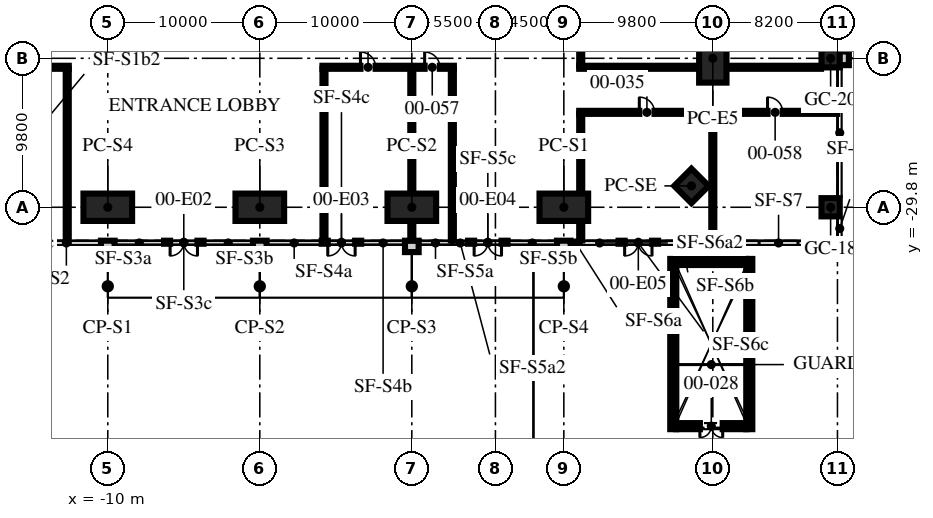
"""IFC4 building model, lengths in metres.
Left out: names, types, materials, properties, quantities, classifications, styles, units other than length and angle.
Written with IfcOpenShell. Run it as: python <this file> out.ifc"""

import sys

from ifc_helpers import new_model, si_unit, direction, frame, frame_2d, origin, origin_2d, place, context, subcontext, project, spatial, rectangle, hollow_rectangle, hollow_circle, extrude, element, fill, save


model = new_model("IFC4")
c1 = context("Model", 3, precision=1e-05, world=origin(), true_north=direction((0.0, 1.0)))
c2 = subcontext(c1, "Body", "Model", "MODEL_VIEW")
j1 = project(units=[si_unit("LENGTHUNIT", "METRE"), si_unit("PLANEANGLEUNIT", "RADIAN")], contexts=[c1])
p1 = place(None, origin())
s1 = spatial("IfcSite", under=j1, at=p1, CompositionType="ELEMENT")
p2 = place(p1, origin())
s2 = spatial("IfcBuilding", under=s1, at=p2, CompositionType="ELEMENT")
p3 = place(p2, origin())
s3 = spatial("IfcBuildingStorey", under=s2, at=p3, CompositionType="ELEMENT", Elevation=0.0)
for number, where, z_axis, x_axis in (
    (1, (29.8, -20.0, 0.0), (0.0, 0.0, 1.0), (0.0, 1.0, 0.0)),
    (2, (20.0, -29.8, 0.0), (0.0, 0.0, 1.0), (1.0, 0.0, 0.0)),
    (3, (10.0, -29.8, 0.0), (0.0, 0.0, 1.0), (1.0, 0.0, 0.0)),
    (4, (0.0, -29.8, 0.0), (0.0, 0.0, 1.0), (1.0, 0.0, 0.0)),
    (5, (-10.0, -29.8, 0.0), (0.0, 0.0, 1.0), (1.0, 0.0, 0.0)),
):
    element("IfcColumn", number, at=place(p3, frame(where, z_axis=z_axis, x_axis=x_axis)), inside=s3, PredefinedType="COLUMN", context=c2, shape_type="SweptSolid", body=[
        extrude(hollow_rectangle(XDim=3.2, YDim=1.8, WallThickness=0.2, at=origin_2d()), origin(), (0.0, 0.0, 1.0), 6.0),
    ])
p4 = place(p3, frame((28.394, -28.394, 0.0), z_axis=(0.0, 0.0, 1.0), x_axis=(0.707106781187, 0.707106781187, 0.0)))
e6 = element("IfcColumn", 6, at=p4, inside=s3, PredefinedType="COLUMN", context=c2, shape_type="SweptSolid", body=[
    extrude(hollow_rectangle(XDim=1.6, YDim=1.6, WallThickness=0.1, at=origin_2d()), origin(), (0.0, 0.0, 1.0), 6.0),
])
for number, where, z_axis, x_axis in (
    (7, (37.55, -29.8, 0.0), (0.0, 0.0, 1.0), (1.0, 0.0, 0.0)),
    (8, (37.55, -20.0, 0.0), (0.0, 0.0, 1.0), (1.0, 0.0, 0.0)),
):
    element("IfcColumn", number, at=place(p3, frame(where, z_axis=z_axis, x_axis=x_axis)), inside=s3, PredefinedType="COLUMN", context=c2, shape_type="SweptSolid", body=[
        extrude(rectangle(XDim=1.2, YDim=1.2, at=origin_2d()), origin(), (0.0, 0.0, 1.0), 6.0),
    ])
for number, where, z_axis, x_axis in (
    (9, (-10.45, -32.375, -0.2), (0.0, 0.0, 1.0), (1.0, 0.0, 0.0)),
    (10, (-0.45, -32.375, -0.2), (0.0, 0.0, 1.0), (1.0, 0.0, 0.0)),
    (11, (9.55, -32.375, -0.2), (0.0, 0.0, 1.0), (1.0, 0.0, 0.0)),
    (12, (19.55, -32.375, -0.2), (0.0, 0.0, 1.0), (1.0, 0.0, 0.0)),
    (13, (29.35, -32.375, -0.2), (0.0, 0.0, 1.0), (1.0, 0.0, 0.0)),
):
    element("IfcWall", number, at=place(p3, frame(where, z_axis=z_axis, x_axis=x_axis)), inside=s3, PredefinedType="SOLIDWALL", context=c2, shape_type="SweptSolid", body=[
        extrude(rectangle(XDim=0.9, YDim=0.75, at=frame_2d((0.45, 0.0))), origin(), (0.0, 0.0, 1.0), 6.2),
    ])
p5 = place(p3, frame((38.0, -32.375, -0.2), z_axis=(0.0, 0.0, 1.0), x_axis=(1.0, 0.0, 0.0)))
e14 = element("IfcWall", 14, at=p5, inside=s3, PredefinedType="SOLIDWALL", context=c2, shape_type="SweptSolid", body=[
    extrude(rectangle(XDim=0.75, YDim=0.75, at=frame_2d((0.375, 0.0))), origin(), (0.0, 0.0, 1.0), 6.2),
])
p6 = place(p3, frame((-6.3, -32.1, 0.0), z_axis=(0.0, 0.0, 1.0), x_axis=(1.0, 0.0, 0.0)))
e15 = element("IfcWall", 15, at=p6, inside=s3, PredefinedType="ELEMENTEDWALL", context=c2, shape_type="SweptSolid", body=[
    extrude(rectangle(XDim=2.6, YDim=0.2, at=frame_2d((1.3, 0.0))), origin(), (0.0, 0.0, 1.0), 3.2),
])
p7 = place(p6, frame((2.2, 0.0, 0.0), z_axis=(0.0, 0.0, 1.0), x_axis=(-1.0, 0.0, 0.0)))
e16 = element("IfcOpeningElement", 16, at=p7, cuts=e15, PredefinedType="OPENING", context=c2, shape_type="SweptSolid", body=[
    extrude(rectangle(XDim=1.8, YDim=2.7, at=frame_2d((0.9, 1.35))), frame((0.0, 0.11, 0.0), z_axis=(0.0, -1.0, 0.0), x_axis=(1.0, 0.0, 0.0)), (0.0, 0.0, 1.0), 0.22),
])
p8 = place(p3, frame((4.072, -32.1, 0.0), z_axis=(0.0, 0.0, 1.0), x_axis=(1.0, 0.0, 0.0)))
e17 = element("IfcWall", 17, at=p8, inside=s3, PredefinedType="ELEMENTEDWALL", context=c2, shape_type="SweptSolid", body=[
    extrude(rectangle(XDim=2.6, YDim=0.2, at=frame_2d((1.3, 0.0))), origin(), (0.0, 0.0, 1.0), 3.2),
])
p9 = place(p8, frame((2.2, 0.0, 0.0), z_axis=(0.0, 0.0, 1.0), x_axis=(-1.0, 0.0, 0.0)))
e18 = element("IfcOpeningElement", 18, at=p9, cuts=e17, PredefinedType="OPENING", context=c2, shape_type="SweptSolid", body=[
    extrude(rectangle(XDim=1.8, YDim=2.7, at=frame_2d((0.9, 1.35))), frame((0.0, 0.11, 0.0), z_axis=(0.0, -1.0, 0.0), x_axis=(1.0, 0.0, 0.0)), (0.0, 0.0, 1.0), 0.22),
])
p10 = place(p3, frame((13.7, -32.1, 0.0), z_axis=(0.0, 0.0, 1.0), x_axis=(1.0, 0.0, 0.0)))
e19 = element("IfcWall", 19, at=p10, inside=s3, PredefinedType="ELEMENTEDWALL", context=c2, shape_type="SweptSolid", body=[
    extrude(rectangle(XDim=2.6, YDim=0.2, at=frame_2d((1.3, 0.0))), origin(), (0.0, 0.0, 1.0), 3.2),
])
p11 = place(p10, frame((2.2, 0.0, 0.0), z_axis=(0.0, 0.0, 1.0), x_axis=(-1.0, 0.0, 0.0)))
e20 = element("IfcOpeningElement", 20, at=p11, cuts=e19, PredefinedType="OPENING", context=c2, shape_type="SweptSolid", body=[
    extrude(rectangle(XDim=1.8, YDim=2.7, at=frame_2d((0.9, 1.35))), frame((0.0, 0.11, 0.0), z_axis=(0.0, -1.0, 0.0), x_axis=(1.0, 0.0, 0.0)), (0.0, 0.0, 1.0), 0.22),
])
p12 = place(p3, frame((23.6, -32.1, 0.0), z_axis=(0.0, 0.0, 1.0), x_axis=(1.0, 0.0, 0.0)))
e21 = element("IfcWall", 21, at=p12, inside=s3, PredefinedType="ELEMENTEDWALL", context=c2, shape_type="SweptSolid", body=[
    extrude(rectangle(XDim=2.6, YDim=0.2, at=frame_2d((1.3, 0.0))), origin(), (0.0, 0.0, 1.0), 3.2),
])
p13 = place(p12, frame((2.2, 0.0, 0.0), z_axis=(0.0, 0.0, 1.0), x_axis=(-1.0, 0.0, 0.0)))
e22 = element("IfcOpeningElement", 22, at=p13, cuts=e21, PredefinedType="OPENING", context=c2, shape_type="SweptSolid", body=[
    extrude(rectangle(XDim=1.8, YDim=2.7, at=frame_2d((0.9, 1.35))), frame((0.0, 0.11, 0.0), z_axis=(0.0, -1.0, 0.0), x_axis=(1.0, 0.0, 0.0)), (0.0, 0.0, 1.0), 0.22),
])
p14 = place(p3, frame((38.375, -20.45, -0.2), z_axis=(0.0, 0.0, 1.0), x_axis=(0.0, 1.0, 0.0)))
e23 = element("IfcWall", 23, at=p14, inside=s3, PredefinedType="SOLIDWALL", context=c2, shape_type="SweptSolid", body=[
    extrude(rectangle(XDim=0.9, YDim=0.75, at=frame_2d((0.45, 0.0))), origin(), (0.0, 0.0, 1.0), 6.2),
])
for number, where, z_axis, x_axis in (
    (24, (-10.0, -35.0, -0.16), (0.0, 0.0, 1.0), (1.0, 0.0, 0.0)),
    (25, (0.0, -35.0, -0.16), (0.0, 0.0, 1.0), (1.0, 0.0, 0.0)),
    (26, (10.0, -35.0, -0.16), (0.0, 0.0, 1.0), (1.0, 0.0, 0.0)),
    (27, (20.0, -35.0, -0.16), (0.0, 0.0, 1.0), (1.0, 0.0, 0.0)),
):
    element("IfcColumn", number, at=place(p3, frame(where, z_axis=z_axis, x_axis=x_axis)), inside=s3, PredefinedType="COLUMN", context=c2, shape_type="SweptSolid", body=[
        extrude(hollow_circle(Radius=0.203, WallThickness=0.012, at=origin_2d()), origin(), (0.0, 0.0, 1.0), 4.16),
    ])
for number, where, z_axis, x_axis in (
    (28, (27.2, -44.4, -0.6), (0.0, 0.0, 1.0), (0.0, 1.0, 0.0)),
    (29, (32.2, -44.4, -0.6), (0.0, 0.0, 1.0), (0.0, 1.0, 0.0)),
):
    element("IfcWall", number, at=place(p3, frame(where, z_axis=z_axis, x_axis=x_axis)), inside=s3, PredefinedType="SOLIDWALL", context=c2, shape_type="SweptSolid", body=[
        extrude(rectangle(XDim=11.2, YDim=0.4, at=frame_2d((5.6, 0.0))), origin(), (0.0, 0.0, 1.0), 3.8),
    ])
p15 = place(p3, frame((27.4, -44.2, -0.6), z_axis=(0.0, 0.0, 1.0), x_axis=(1.0, 0.0, 0.0)))
e30 = element("IfcWall", 30, at=p15, inside=s3, PredefinedType="SOLIDWALL", context=c2, shape_type="SweptSolid", body=[
    extrude(rectangle(XDim=4.6, YDim=0.4, at=frame_2d((2.3, 0.0))), origin(), (0.0, 0.0, 1.0), 3.8),
])
p16 = place(p15, frame((3.05, 0.0, 0.6), z_axis=(0.0, 0.0, 1.0), x_axis=(-1.0, 0.0, 0.0)))
e31 = element("IfcOpeningElement", 31, at=p16, cuts=e30, PredefinedType="OPENING", context=c2, shape_type="SweptSolid", body=[
    extrude(rectangle(XDim=1.5, YDim=2.1, at=frame_2d((0.75, 1.05))), frame((0.0, 0.21, 0.0), z_axis=(0.0, -1.0, 0.0), x_axis=(1.0, 0.0, 0.0)), (0.0, 0.0, 1.0), 0.42),
])
p17 = place(p3, frame((27.4, -33.4, -0.6), z_axis=(0.0, 0.0, 1.0), x_axis=(1.0, 0.0, 0.0)))
e32 = element("IfcWall", 32, at=p17, inside=s3, PredefinedType="SOLIDWALL", context=c2, shape_type="SweptSolid", body=[
    extrude(rectangle(XDim=4.6, YDim=0.4, at=frame_2d((2.3, 0.0))), origin(), (0.0, 0.0, 1.0), 3.8),
])
p18 = place(p3, frame((-12.667, -32.075, 0.0), z_axis=(0.0, 0.0, 1.0), x_axis=(0.0, 1.0, 0.0)))
e33 = element("IfcWall", 33, at=p18, inside=s3, PredefinedType="SOLIDWALL", context=c2, shape_type="SweptSolid", body=[
    extrude(rectangle(XDim=11.384, YDim=0.2, at=frame_2d((5.692, 0.0))), origin(), (0.0, 0.0, 1.0), 4.7),
])
p19 = place(p3, frame((4.222, -31.98, 0.0), z_axis=(0.0, 0.0, 1.0), x_axis=(0.0, 1.0, 0.0)))
e34 = element("IfcWall", 34, at=p19, inside=s3, PredefinedType="SOLIDWALL", context=c2, shape_type="SweptSolid", body=[
    extrude(rectangle(XDim=11.289, YDim=0.2, at=frame_2d((5.645, 0.0))), origin(), (0.0, 0.0, 1.0), 4.7),
])
p20 = place(p3, frame((10.0, -31.98, 0.0), z_axis=(0.0, 0.0, 1.0), x_axis=(0.0, 1.0, 0.0)))
e35 = element("IfcWall", 35, at=p20, inside=s3, PredefinedType="SOLIDWALL", context=c2, shape_type="SweptSolid", body=[
    extrude(rectangle(XDim=1.25, YDim=0.2, at=frame_2d((0.625, 0.0))), origin(), (0.0, 0.0, 1.0), 5.7),
])
p21 = place(p3, frame((12.667, -31.98, 0.0), z_axis=(0.0, 0.0, 1.0), x_axis=(0.0, 1.0, 0.0)))
e36 = element("IfcWall", 36, at=p21, inside=s3, PredefinedType="SOLIDWALL", context=c2, shape_type="SweptSolid", body=[
    extrude(rectangle(XDim=11.289, YDim=0.2, at=frame_2d((5.645, 0.0))), origin(), (0.0, 0.0, 1.0), 4.7),
])
p22 = place(p3, frame((21.111, -31.98, 0.0), z_axis=(0.0, 0.0, 1.0), x_axis=(0.0, 1.0, 0.0)))
e37 = element("IfcWall", 37, at=p22, inside=s3, PredefinedType="SOLIDWALL", context=c2, shape_type="SweptSolid", body=[
    extrude(rectangle(XDim=1.25, YDim=0.2, at=frame_2d((0.625, 0.0))), origin(), (0.0, 0.0, 1.0), 5.7),
])
p23 = place(p3, frame((29.8, -31.98, 0.0), z_axis=(0.0, 0.0, 1.0), x_axis=(0.0, 1.0, 0.0)))
e38 = element("IfcWall", 38, at=p23, inside=s3, PredefinedType="SOLIDWALL", context=c2, shape_type="SweptSolid", body=[
    extrude(rectangle(XDim=8.324, YDim=0.2, at=frame_2d((4.162, 0.0))), origin(), (0.0, 0.0, 1.0), 5.7),
])
p24 = place(p3, frame((10.0, -28.87, 0.0), z_axis=(0.0, 0.0, 1.0), x_axis=(0.0, 1.0, 0.0)))
e39 = element("IfcWall", 39, at=p24, inside=s3, PredefinedType="SOLIDWALL", context=c2, shape_type="SweptSolid", body=[
    extrude(rectangle(XDim=8.179, YDim=0.2, at=frame_2d((4.089, 0.0))), origin(), (0.0, 0.0, 1.0), 4.5),
])
p25 = place(p3, frame((21.111, -28.87, 0.0), z_axis=(0.0, 0.0, 1.0), x_axis=(0.0, 1.0, 0.0)))
e40 = element("IfcWall", 40, at=p25, inside=s3, PredefinedType="SOLIDWALL", context=c2, shape_type="SweptSolid", body=[
    extrude(rectangle(XDim=5.214, YDim=0.2, at=frame_2d((2.607, 0.0))), origin(), (0.0, 0.0, 1.0), 5.7),
])
p26 = place(p3, frame((21.011, -23.556, 0.0), z_axis=(0.0, 0.0, 1.0), x_axis=(1.0, 0.0, 0.0)))
e41 = element("IfcWall", 41, at=p26, inside=s3, PredefinedType="SOLIDWALL", context=c2, shape_type="SweptSolid", body=[
    extrude(rectangle(XDim=16.969, YDim=0.2, at=frame_2d((8.484, 0.0))), origin(), (0.0, 0.0, 1.0), 4.5),
])
p27 = place(p26, frame((3.955, 0.0, 0.0)))
e42 = element("IfcOpeningElement", 42, at=p27, cuts=e41, PredefinedType="OPENING", context=c2, shape_type="SweptSolid", body=[
    extrude(rectangle(XDim=1.0, YDim=2.1, at=frame_2d((0.5, 1.05))), frame((0.0, 0.11, 0.0), z_axis=(0.0, -1.0, 0.0), x_axis=(1.0, 0.0, 0.0)), (0.0, 0.0, 1.0), 0.22),
])
p28 = place(p26, frame((12.389, 0.0, 0.0)))
e43 = element("IfcOpeningElement", 43, at=p28, cuts=e41, PredefinedType="OPENING", context=c2, shape_type="SweptSolid", body=[
    extrude(rectangle(XDim=1.0, YDim=2.1, at=frame_2d((0.5, 1.05))), frame((0.0, 0.11, 0.0), z_axis=(0.0, -1.0, 0.0), x_axis=(1.0, 0.0, 0.0)), (0.0, 0.0, 1.0), 0.22),
])
p29 = place(p3, frame((-28.87, -20.591, 0.0), z_axis=(0.0, 0.0, 1.0), x_axis=(1.0, 0.0, 0.0)))
e44 = element("IfcWall", 44, at=p29, inside=s3, PredefinedType="SOLIDWALL", context=c2, shape_type="SweptSolid", body=[
    extrude(rectangle(XDim=16.303, YDim=0.2, at=frame_2d((8.151, 0.0))), origin(), (0.0, 0.0, 1.0), 4.5),
])
p30 = place(p29, frame((11.091, 0.0, 0.0)))
e45 = element("IfcOpeningElement", 45, at=p30, cuts=e44, PredefinedType="OPENING", context=c2, shape_type="SweptSolid", body=[
    extrude(rectangle(XDim=1.8, YDim=2.4, at=frame_2d((0.9, 1.2))), frame((0.0, 0.11, 0.0), z_axis=(0.0, -1.0, 0.0), x_axis=(1.0, 0.0, 0.0)), (0.0, 0.0, 1.0), 0.22),
])
p31 = place(p3, frame((4.122, -20.591, 0.0), z_axis=(0.0, 0.0, 1.0), x_axis=(1.0, 0.0, 0.0)))
e46 = element("IfcWall", 46, at=p31, inside=s3, PredefinedType="SOLIDWALL", context=c2, shape_type="SweptSolid", body=[
    extrude(rectangle(XDim=8.645, YDim=0.2, at=frame_2d((4.323, 0.0))), origin(), (0.0, 0.0, 1.0), 4.5),
])
p32 = place(p31, frame((2.499, 0.0, 0.0)))
e47 = element("IfcOpeningElement", 47, at=p32, cuts=e46, PredefinedType="OPENING", context=c2, shape_type="SweptSolid", body=[
    extrude(rectangle(XDim=1.0, YDim=2.1, at=frame_2d((0.5, 1.05))), frame((0.0, 0.11, 0.0), z_axis=(0.0, -1.0, 0.0), x_axis=(1.0, 0.0, 0.0)), (0.0, 0.0, 1.0), 0.22),
])
p33 = place(p31, frame((6.721, 0.0, 0.0)))
e48 = element("IfcOpeningElement", 48, at=p33, cuts=e46, PredefinedType="OPENING", context=c2, shape_type="SweptSolid", body=[
    extrude(rectangle(XDim=1.0, YDim=2.1, at=frame_2d((0.5, 1.05))), frame((0.0, 0.11, 0.0), z_axis=(0.0, -1.0, 0.0), x_axis=(1.0, 0.0, 0.0)), (0.0, 0.0, 1.0), 0.22),
])
p34 = place(p3, frame((21.011, -20.591, 0.0), z_axis=(0.0, 0.0, 1.0), x_axis=(1.0, 0.0, 0.0)))
e49 = element("IfcWall", 49, at=p34, inside=s3, PredefinedType="SOLIDWALL", context=c2, shape_type="SweptSolid", body=[
    extrude(rectangle(XDim=7.859, YDim=0.2, at=frame_2d((3.929, 0.0))), origin(), (0.0, 0.0, 1.0), 4.5),
])
p35 = place(p3, frame((30.73, -20.591, 0.0), z_axis=(0.0, 0.0, 1.0), x_axis=(1.0, 0.0, 0.0)))
e50 = element("IfcWall", 50, at=p35, inside=s3, PredefinedType="SOLIDWALL", context=c2, shape_type="SweptSolid", body=[
    extrude(rectangle(XDim=6.19, YDim=0.2, at=frame_2d((3.095, 0.0))), origin(), (0.0, 0.0, 1.0), 4.7),
])
p36 = place(p3, frame((21.111, -20.491, 0.0), z_axis=(0.0, 0.0, 1.0), x_axis=(0.0, 1.0, 0.0)))
e51 = element("IfcWall", 51, at=p36, inside=s3, PredefinedType="SOLIDWALL", context=c2, shape_type="SweptSolid", body=[
    extrude(rectangle(XDim=42.022, YDim=0.2, at=frame_2d((21.011, 0.0))), origin(), (0.0, 0.0, 1.0), 4.5),
])
p37 = place(p36, frame((5.962, 0.0, 0.0)))
e52 = element("IfcOpeningElement", 52, at=p37, cuts=e51, PredefinedType="OPENING", context=c2, shape_type="SweptSolid", body=[
    extrude(rectangle(XDim=1.8, YDim=2.4, at=frame_2d((0.9, 1.2))), frame((0.0, 0.11, 0.0), z_axis=(0.0, -1.0, 0.0), x_axis=(1.0, 0.0, 0.0)), (0.0, 0.0, 1.0), 0.22),
])
p38 = place(p36, frame((17.546, 0.0, 0.0)))
e53 = element("IfcOpeningElement", 53, at=p38, cuts=e51, PredefinedType="OPENING", context=c2, shape_type="SweptSolid", body=[
    extrude(rectangle(XDim=1.0, YDim=2.1, at=frame_2d((0.5, 1.05))), frame((0.0, 0.11, 0.0), z_axis=(0.0, -1.0, 0.0), x_axis=(1.0, 0.0, 0.0)), (0.0, 0.0, 1.0), 0.22),
])
p39 = place(p36, frame((25.991, 0.0, 0.0)))
e54 = element("IfcOpeningElement", 54, at=p39, cuts=e51, PredefinedType="OPENING", context=c2, shape_type="SweptSolid", body=[
    extrude(rectangle(XDim=1.0, YDim=2.1, at=frame_2d((0.5, 1.05))), frame((0.0, 0.11, 0.0), z_axis=(0.0, -1.0, 0.0), x_axis=(1.0, 0.0, 0.0)), (0.0, 0.0, 1.0), 0.22),
])
p40 = place(p36, frame((35.917, 0.0, 0.0)))
e55 = element("IfcOpeningElement", 55, at=p40, cuts=e51, PredefinedType="OPENING", context=c2, shape_type="SweptSolid", body=[
    extrude(rectangle(XDim=1.0, YDim=2.1, at=frame_2d((0.5, 1.05))), frame((0.0, 0.11, 0.0), z_axis=(0.0, -1.0, 0.0), x_axis=(1.0, 0.0, 0.0)), (0.0, 0.0, 1.0), 0.22),
])
p41 = place(p7, origin())
e56 = element("IfcDoor", 56, at=p41, inside=s3, OperationType="SINGLE_SWING_LEFT", PredefinedType="DOOR", context=c2, shape_type="SweptSolid", body=[
    extrude(rectangle(XDim=1.8, YDim=2.7, at=frame_2d((0.9, 1.35))), frame((0.0, 0.025, 0.0), z_axis=(0.0, -1.0, 0.0), x_axis=(1.0, 0.0, 0.0)), (0.0, 0.0, 1.0), 0.05),
])
fill(e16, e56)
p42 = place(p9, origin())
e57 = element("IfcDoor", 57, at=p42, inside=s3, OperationType="SINGLE_SWING_LEFT", PredefinedType="DOOR", context=c2, shape_type="SweptSolid", body=[
    extrude(rectangle(XDim=1.8, YDim=2.7, at=frame_2d((0.9, 1.35))), frame((0.0, 0.025, 0.0), z_axis=(0.0, -1.0, 0.0), x_axis=(1.0, 0.0, 0.0)), (0.0, 0.0, 1.0), 0.05),
])
fill(e18, e57)
p43 = place(p11, origin())
e58 = element("IfcDoor", 58, at=p43, inside=s3, OperationType="SINGLE_SWING_LEFT", PredefinedType="DOOR", context=c2, shape_type="SweptSolid", body=[
    extrude(rectangle(XDim=1.8, YDim=2.7, at=frame_2d((0.9, 1.35))), frame((0.0, 0.025, 0.0), z_axis=(0.0, -1.0, 0.0), x_axis=(1.0, 0.0, 0.0)), (0.0, 0.0, 1.0), 0.05),
])
fill(e20, e58)
p44 = place(p13, origin())
e59 = element("IfcDoor", 59, at=p44, inside=s3, OperationType="SINGLE_SWING_LEFT", PredefinedType="DOOR", context=c2, shape_type="SweptSolid", body=[
    extrude(rectangle(XDim=1.8, YDim=2.7, at=frame_2d((0.9, 1.35))), frame((0.0, 0.025, 0.0), z_axis=(0.0, -1.0, 0.0), x_axis=(1.0, 0.0, 0.0)), (0.0, 0.0, 1.0), 0.05),
])
fill(e22, e59)
p45 = place(p16, origin())
e60 = element("IfcDoor", 60, at=p45, inside=s3, OperationType="DOUBLE_DOOR_SINGLE_SWING", PredefinedType="DOOR", context=c2, shape_type="SweptSolid", body=[
    extrude(rectangle(XDim=1.5, YDim=2.1, at=frame_2d((0.75, 1.05))), frame((0.0, 0.025, 0.0), z_axis=(0.0, -1.0, 0.0), x_axis=(1.0, 0.0, 0.0)), (0.0, 0.0, 1.0), 0.05),
])
fill(e31, e60)
p46 = place(p32, origin())
e61 = element("IfcDoor", 61, at=p46, inside=s3, OperationType="SINGLE_SWING_LEFT", PredefinedType="DOOR", context=c2, shape_type="SweptSolid", body=[
    extrude(rectangle(XDim=1.0, YDim=2.1, at=frame_2d((0.5, 1.05))), frame((0.0, 0.025, 0.0), z_axis=(0.0, -1.0, 0.0), x_axis=(1.0, 0.0, 0.0)), (0.0, 0.0, 1.0), 0.05),
])
fill(e47, e61)
p47 = place(p27, origin())
e62 = element("IfcDoor", 62, at=p47, inside=s3, OperationType="SINGLE_SWING_LEFT", PredefinedType="DOOR", context=c2, shape_type="SweptSolid", body=[
    extrude(rectangle(XDim=1.0, YDim=2.1, at=frame_2d((0.5, 1.05))), frame((0.0, 0.025, 0.0), z_axis=(0.0, -1.0, 0.0), x_axis=(1.0, 0.0, 0.0)), (0.0, 0.0, 1.0), 0.05),
])
fill(e42, e62)
p48 = place(p33, origin())
e63 = element("IfcDoor", 63, at=p48, inside=s3, OperationType="SINGLE_SWING_LEFT", PredefinedType="DOOR", context=c2, shape_type="SweptSolid", body=[
    extrude(rectangle(XDim=1.0, YDim=2.1, at=frame_2d((0.5, 1.05))), frame((0.0, 0.025, 0.0), z_axis=(0.0, -1.0, 0.0), x_axis=(1.0, 0.0, 0.0)), (0.0, 0.0, 1.0), 0.05),
])
fill(e48, e63)
p49 = place(p28, origin())
e64 = element("IfcDoor", 64, at=p49, inside=s3, OperationType="SINGLE_SWING_LEFT", PredefinedType="DOOR", context=c2, shape_type="SweptSolid", body=[
    extrude(rectangle(XDim=1.0, YDim=2.1, at=frame_2d((0.5, 1.05))), frame((0.0, 0.025, 0.0), z_axis=(0.0, -1.0, 0.0), x_axis=(1.0, 0.0, 0.0)), (0.0, 0.0, 1.0), 0.05),
])
fill(e43, e64)
save(model, sys.argv[1])
